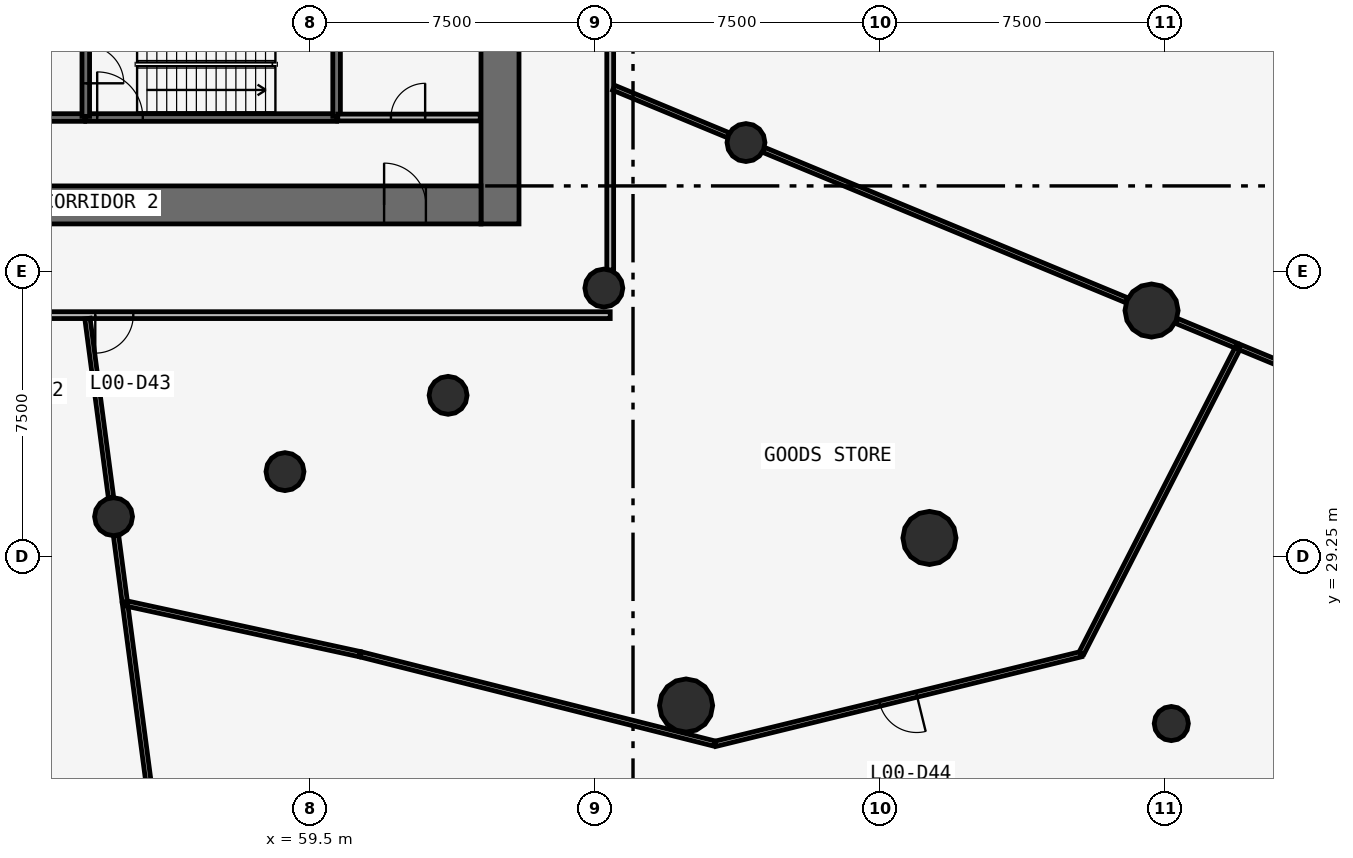
"""IFC4 building model, lengths in metres.
Left out: names, types, materials, properties, quantities, classifications, styles, units other than length and angle.
Written with IfcOpenShell. Run it as: python <this file> out.ifc"""

import sys

from ifc_helpers import new_model, si_unit, direction, frame, frame_2d, origin, origin_2d, place, context, subcontext, project, spatial, rectangle, circle, extrude, source, transform, mapped, element, fill, save


model = new_model("IFC4")
c1 = context("Model", 3, precision=1e-05, world=origin(), true_north=direction((0.0, 1.0)))
c2 = subcontext(c1, "Body", "Model", "MODEL_VIEW")
j1 = project(units=[si_unit("LENGTHUNIT", "METRE"), si_unit("PLANEANGLEUNIT", "RADIAN")], contexts=[c1])
p1 = place(None, origin())
s1 = spatial("IfcSite", under=j1, at=p1, CompositionType="ELEMENT")
p2 = place(p1, origin())
s2 = spatial("IfcBuilding", under=s1, at=p2, CompositionType="ELEMENT")
p3 = place(p2, origin())
s3 = spatial("IfcBuildingStorey", under=s2, at=p3, CompositionType="ELEMENT", Elevation=0.0)
p4 = place(p3, frame((64.5, 38.0, -0.35), z_axis=(0.0, 0.0, 1.0), x_axis=(0.0, 1.0, 0.0)))
e1 = element("IfcWall", 1, at=p4, inside=s3, PredefinedType="SHEAR", context=c2, shape_type="SweptSolid", body=[
    extrude(rectangle(XDim=20.0, YDim=1.0, at=frame_2d((10.0, 0.0))), origin(), (0.0, 0.0, 1.0), 5.35),
])
p5 = place(p4, frame((9.1, 0.0, 0.35)))
e2 = element("IfcOpeningElement", 2, at=p5, cuts=e1, PredefinedType="OPENING", context=c2, shape_type="SweptSolid", body=[
    extrude(rectangle(XDim=1.8, YDim=2.1, at=frame_2d((0.9, 1.05))), frame((0.0, 0.51, 0.0), z_axis=(0.0, -1.0, 0.0), x_axis=(1.0, 0.0, 0.0)), (0.0, 0.0, 1.0), 1.02),
])
p6 = place(p3, frame((40.0, 38.5, -0.35), z_axis=(0.0, 0.0, 1.0), x_axis=(1.0, 0.0, 0.0)))
e3 = element("IfcWall", 3, at=p6, inside=s3, PredefinedType="SHEAR", context=c2, shape_type="SweptSolid", body=[
    extrude(rectangle(XDim=24.0, YDim=1.0, at=frame_2d((12.0, 0.0))), origin(), (0.0, 0.0, 1.0), 5.35),
])
p7 = place(p6, frame((21.45, 0.0, 0.35)))
e4 = element("IfcOpeningElement", 4, at=p7, cuts=e3, PredefinedType="OPENING", context=c2, shape_type="SweptSolid", body=[
    extrude(rectangle(XDim=1.1, YDim=2.1, at=frame_2d((0.55, 1.05))), frame((0.0, 0.51, 0.0), z_axis=(0.0, -1.0, 0.0), x_axis=(1.0, 0.0, 0.0)), (0.0, 0.0, 1.0), 1.02),
])
p8 = place(p6, frame((1.95, 0.0, 0.35)))
e5 = element("IfcOpeningElement", 5, at=p8, cuts=e3, PredefinedType="OPENING", context=c2, shape_type="SweptSolid", body=[
    extrude(rectangle(XDim=1.1, YDim=2.1, at=frame_2d((0.55, 1.05))), frame((0.0, 0.51, 0.0), z_axis=(0.0, -1.0, 0.0), x_axis=(1.0, 0.0, 0.0)), (0.0, 0.0, 1.0), 1.02),
])
m1 = source(origin(), c2, "Body", "SweptSolid", [
    extrude(circle(Radius=0.7, at=origin_2d()), origin(), (0.0, 0.0, 1.0), 5.35),
])
for number, where, z_axis, x_axis in (
    (6, (69.396, 25.328, -0.35), (0.0, 0.0, 1.0), (1.0, 0.0, 0.0)),
    (7, (75.801, 29.737, -0.35), (0.0, 0.0, 1.0), (1.0, 0.0, 0.0)),
    (8, (81.645, 35.721, -0.35), (0.0, 0.0, 1.0), (1.0, 0.0, 0.0)),
):
    element("IfcColumn", number, at=place(p3, frame(where, z_axis=z_axis, x_axis=x_axis)), inside=s3, PredefinedType="COLUMN", context=c2, shape_type="MappedRepresentation", body=[
        mapped(m1, transform((0.0, 0.0, 0.0), scale=1.0)),
    ])
m2 = source(origin(), c2, "Body", "SweptSolid", [
    extrude(circle(Radius=0.5, at=origin_2d()), origin(), (0.0, 0.0, 1.0), 5.35),
])
for number, where, z_axis, x_axis in (
    (9, (54.331, 30.297, -0.35), (0.0, 0.0, 1.0), (1.0, 0.0, 0.0)),
    (10, (58.842, 31.482, -0.35), (0.0, 0.0, 1.0), (1.0, 0.0, 0.0)),
    (11, (63.134, 33.49, -0.35), (0.0, 0.0, 1.0), (1.0, 0.0, 0.0)),
    (12, (67.232, 36.312, -0.35), (0.0, 0.0, 1.0), (1.0, 0.0, 0.0)),
    (13, (70.972, 40.141, -0.35), (0.0, 0.0, 1.0), (1.0, 0.0, 0.0)),
):
    element("IfcColumn", number, at=place(p3, frame(where, z_axis=z_axis, x_axis=x_axis)), inside=s3, PredefinedType="COLUMN", context=c2, shape_type="MappedRepresentation", body=[
        mapped(m2, transform((0.0, 0.0, 0.0), scale=1.0)),
    ])
m3 = source(origin(), c2, "Body", "SweptSolid", [
    extrude(circle(Radius=0.45, at=origin_2d()), origin(), (0.0, 0.0, 1.0), 5.35),
])
p9 = place(p3, frame((82.165, 24.854, -0.35), z_axis=(0.0, 0.0, 1.0), x_axis=(1.0, 0.0, 0.0)))
e14 = element("IfcColumn", 14, at=p9, inside=s3, PredefinedType="COLUMN", context=c2, shape_type="MappedRepresentation", body=[
    mapped(m3, transform((0.0, 0.0, 0.0), scale=1.0)),
])
p10 = place(p3, frame((53.6, 40.8, 0.0), z_axis=(0.0, 0.0, 1.0), x_axis=(1.0, 0.0, 0.0)))
e15 = element("IfcWall", 15, at=p10, inside=s3, PredefinedType="SOLIDWALL", context=c2, shape_type="SweptSolid", body=[
    extrude(rectangle(XDim=6.6, YDim=0.2, at=frame_2d((3.3, 0.0))), origin(), (0.0, 0.0, 1.0), 4.65),
])
p11 = place(p10, frame((0.3, 0.0, 0.0)))
e16 = element("IfcOpeningElement", 16, at=p11, cuts=e15, PredefinedType="OPENING", context=c2, shape_type="SweptSolid", body=[
    extrude(rectangle(XDim=1.2, YDim=2.1, at=frame_2d((0.6, 1.05))), frame((0.0, 0.11, 0.0), z_axis=(0.0, -1.0, 0.0), x_axis=(1.0, 0.0, 0.0)), (0.0, 0.0, 1.0), 0.22),
])
p12 = place(p3, frame((47.9, 40.8, 0.0), z_axis=(0.0, 0.0, 1.0), x_axis=(1.0, 0.0, 0.0)))
e17 = element("IfcWall", 17, at=p12, inside=s3, PredefinedType="SOLIDWALL", context=c2, shape_type="SweptSolid", body=[
    extrude(rectangle(XDim=5.67, YDim=0.2, at=frame_2d((2.835, 0.0))), origin(), (0.0, 0.0, 1.0), 4.65),
])
p13 = place(p12, frame((2.95, 0.0, 0.0)))
e18 = element("IfcOpeningElement", 18, at=p13, cuts=e17, PredefinedType="OPENING", context=c2, shape_type="SweptSolid", body=[
    extrude(rectangle(XDim=1.1, YDim=2.1, at=frame_2d((0.55, 1.05))), frame((0.0, 0.11, 0.0), z_axis=(0.0, -1.0, 0.0), x_axis=(1.0, 0.0, 0.0)), (0.0, 0.0, 1.0), 0.22),
])
p14 = place(p3, frame((60.2, 40.83, 0.0), z_axis=(0.0, 0.0, 1.0), x_axis=(0.0, 1.0, 0.0)))
e19 = element("IfcWall", 19, at=p14, inside=s3, PredefinedType="SOLIDWALL", context=c2, shape_type="SweptSolid", body=[
    extrude(rectangle(XDim=2.77, YDim=0.2, at=frame_2d((1.385, 0.0))), origin(), (0.0, 0.0, 1.0), 4.65),
])
p15 = place(p3, frame((53.6, 43.6, 0.0), z_axis=(0.0, 0.0, 1.0), x_axis=(0.0, -1.0, 0.0)))
e20 = element("IfcWall", 20, at=p15, inside=s3, PredefinedType="SOLIDWALL", context=c2, shape_type="SweptSolid", body=[
    extrude(rectangle(XDim=2.77, YDim=0.2, at=frame_2d((1.385, 0.0))), origin(), (0.0, 0.0, 1.0), 4.65),
])
p16 = place(p15, frame((0.9, 0.0, 0.0)))
e21 = element("IfcOpeningElement", 21, at=p16, cuts=e20, PredefinedType="OPENING", context=c2, shape_type="SweptSolid", body=[
    extrude(rectangle(XDim=1.0, YDim=2.1, at=frame_2d((0.5, 1.05))), frame((0.0, 0.11, 0.0), z_axis=(0.0, -1.0, 0.0), x_axis=(1.0, 0.0, 0.0)), (0.0, 0.0, 1.0), 0.22),
])
p17 = place(p3, frame((67.4, 35.6, 0.0), z_axis=(0.0, 0.0, 1.0), x_axis=(-1.0, 0.0, 0.0)))
e22 = element("IfcWall", 22, at=p17, inside=s3, PredefinedType="PARTITIONING", context=c2, shape_type="SweptSolid", body=[
    extrude(rectangle(XDim=30.8, YDim=0.18, at=frame_2d((15.4, 0.0))), origin(), (0.0, 0.0, 1.0), 3.85),
])
p18 = place(p17, frame((20.95, 0.0, 0.0)))
e23 = element("IfcOpeningElement", 23, at=p18, cuts=e22, PredefinedType="OPENING", context=c2, shape_type="SweptSolid", body=[
    extrude(rectangle(XDim=1.0, YDim=2.1, at=frame_2d((0.5, 1.05))), frame((0.0, 0.1, 0.0), z_axis=(0.0, -1.0, 0.0), x_axis=(1.0, 0.0, 0.0)), (0.0, 0.0, 1.0), 0.2),
])
p19 = place(p17, frame((14.95, 0.0, 0.0)))
e24 = element("IfcOpeningElement", 24, at=p19, cuts=e22, PredefinedType="OPENING", context=c2, shape_type="SweptSolid", body=[
    extrude(rectangle(XDim=1.0, YDim=2.1, at=frame_2d((0.5, 1.05))), frame((0.0, 0.1, 0.0), z_axis=(0.0, -1.0, 0.0), x_axis=(1.0, 0.0, 0.0)), (0.0, 0.0, 1.0), 0.2),
])
p20 = place(p17, frame((12.55, 0.0, 0.0)))
e25 = element("IfcOpeningElement", 25, at=p20, cuts=e22, PredefinedType="OPENING", context=c2, shape_type="SweptSolid", body=[
    extrude(rectangle(XDim=1.0, YDim=2.1, at=frame_2d((0.5, 1.05))), frame((0.0, 0.1, 0.0), z_axis=(0.0, -1.0, 0.0), x_axis=(1.0, 0.0, 0.0)), (0.0, 0.0, 1.0), 0.2),
])
p21 = place(p3, frame((67.4, 60.37, 0.0), z_axis=(0.0, 0.0, 1.0), x_axis=(0.0, -1.0, 0.0)))
e26 = element("IfcWall", 26, at=p21, inside=s3, PredefinedType="PARTITIONING", context=c2, shape_type="SweptSolid", body=[
    extrude(rectangle(XDim=23.583, YDim=0.18, at=frame_2d((11.791, 0.0))), origin(), (0.0, 0.0, 1.0), 3.85),
])
p22 = place(p21, frame((11.333, 0.0, 0.0)))
e27 = element("IfcOpeningElement", 27, at=p22, cuts=e26, PredefinedType="OPENING", context=c2, shape_type="SweptSolid", body=[
    extrude(rectangle(XDim=1.0, YDim=2.1, at=frame_2d((0.5, 1.05))), frame((0.0, 0.1, 0.0), z_axis=(0.0, -1.0, 0.0), x_axis=(1.0, 0.0, 0.0)), (0.0, 0.0, 1.0), 0.2),
])
p23 = place(p21, frame((4.532, 0.0, 0.0)))
e28 = element("IfcOpeningElement", 28, at=p23, cuts=e26, PredefinedType="OPENING", context=c2, shape_type="SweptSolid", body=[
    extrude(rectangle(XDim=1.0, YDim=2.1, at=frame_2d((0.5, 1.05))), frame((0.0, 0.1, 0.0), z_axis=(0.0, -1.0, 0.0), x_axis=(1.0, 0.0, 0.0)), (0.0, 0.0, 1.0), 0.2),
])
p24 = place(p3, frame((60.23, 40.8, 0.0), z_axis=(0.0, 0.0, 1.0), x_axis=(1.0, 0.0, 0.0)))
e29 = element("IfcWall", 29, at=p24, inside=s3, PredefinedType="PARTITIONING", context=c2, shape_type="SweptSolid", body=[
    extrude(rectangle(XDim=3.75, YDim=0.18, at=frame_2d((1.875, 0.0))), origin(), (0.0, 0.0, 1.0), 4.65),
])
p25 = place(p24, frame((1.4, 0.0, 0.0)))
e30 = element("IfcOpeningElement", 30, at=p25, cuts=e29, PredefinedType="OPENING", context=c2, shape_type="SweptSolid", body=[
    extrude(rectangle(XDim=0.9, YDim=2.1, at=frame_2d((0.45, 1.05))), frame((0.0, 0.1, 0.0), z_axis=(0.0, -1.0, 0.0), x_axis=(1.0, 0.0, 0.0)), (0.0, 0.0, 1.0), 0.2),
])
p26 = place(p3, frame((71.439, 39.948, 0.0), z_axis=(0.0, 0.0, 1.0), x_axis=(0.923874685699, -0.382695133396, 0.0)))
e31 = element("IfcWall", 31, at=p26, inside=s3, PredefinedType="PARTITIONING", context=c2, shape_type="SweptSolid", body=[
    extrude(rectangle(XDim=10.341, YDim=0.14, at=frame_2d((5.17, 0.0))), origin(), (0.0, 0.0, 1.0), 3.85),
])
p27 = place(p3, frame((79.788, 26.678, 0.0), z_axis=(0.0, 0.0, 1.0), x_axis=(-0.971254631913, -0.238042937278, 0.0)))
e32 = element("IfcWall", 32, at=p27, inside=s3, PredefinedType="PARTITIONING", context=c2, shape_type="SweptSolid", body=[
    extrude(rectangle(XDim=9.902, YDim=0.14, at=frame_2d((4.951, 0.0))), origin(), (0.0, 0.0, 1.0), 3.85),
])
p28 = place(p27, frame((4.452, 0.0, 0.0)))
e33 = element("IfcOpeningElement", 33, at=p28, cuts=e32, PredefinedType="OPENING", context=c2, shape_type="SweptSolid", body=[
    extrude(rectangle(XDim=1.0, YDim=2.1, at=frame_2d((0.5, 1.05))), frame((0.0, 0.08, 0.0), z_axis=(0.0, -1.0, 0.0), x_axis=(1.0, 0.0, 0.0)), (0.0, 0.0, 1.0), 0.16),
])
p29 = place(p3, frame((60.833, 26.674, 0.0), z_axis=(0.0, 0.0, 1.0), x_axis=(0.969661844415, -0.244450214738, 0.0)))
e34 = element("IfcWall", 34, at=p29, inside=s3, PredefinedType="PARTITIONING", context=c2, shape_type="SweptSolid", body=[
    extrude(rectangle(XDim=9.599, YDim=0.14, at=frame_2d((4.799, 0.0))), origin(), (0.0, 0.0, 1.0), 3.85),
])
p30 = place(p3, frame((79.801, 26.705, 0.0), z_axis=(0.0, 0.0, 1.0), x_axis=(0.455715060909, 0.890125712055, 0.0)))
e35 = element("IfcWall", 35, at=p30, inside=s3, PredefinedType="PARTITIONING", context=c2, shape_type="SweptSolid", body=[
    extrude(rectangle(XDim=9.064, YDim=0.14, at=frame_2d((4.532, 0.0))), origin(), (0.0, 0.0, 1.0), 3.85),
])
p31 = place(p3, frame((82.296, 35.451, 0.0), z_axis=(0.0, 0.0, 1.0), x_axis=(0.923894384947, -0.382647573445, 0.0)))
e36 = element("IfcWall", 36, at=p31, inside=s3, PredefinedType="PARTITIONING", context=c2, shape_type="SweptSolid", body=[
    extrude(rectangle(XDim=1.701, YDim=0.14, at=frame_2d((0.851, 0.0))), origin(), (0.0, 0.0, 1.0), 3.85),
])
p32 = place(p3, frame((83.96, 34.762, 0.0), z_axis=(0.0, 0.0, 1.0), x_axis=(0.923875284448, -0.382693687936, 0.0)))
e37 = element("IfcWall", 37, at=p32, inside=s3, PredefinedType="PARTITIONING", context=c2, shape_type="SweptSolid", body=[
    extrude(rectangle(XDim=5.298, YDim=0.14, at=frame_2d((2.649, 0.0))), origin(), (0.0, 0.0, 1.0), 3.85),
])
p33 = place(p3, frame((54.63, 28.022, 0.0), z_axis=(0.0, 0.0, 1.0), x_axis=(0.130536083574, -0.991443559102, 0.0)))
e38 = element("IfcWall", 38, at=p33, inside=s3, PredefinedType="PARTITIONING", context=c2, shape_type="SweptSolid", body=[
    extrude(rectangle(XDim=7.045, YDim=0.14, at=frame_2d((3.523, 0.0))), origin(), (0.0, 0.0, 1.0), 3.85),
])
p34 = place(p3, frame((54.703, 28.006, 0.0), z_axis=(0.0, 0.0, 1.0), x_axis=(0.977213758918, -0.212257554358, 0.0)))
e39 = element("IfcWall", 39, at=p34, inside=s3, PredefinedType="PARTITIONING", context=c2, shape_type="SweptSolid", body=[
    extrude(rectangle(XDim=6.243, YDim=0.14, at=frame_2d((3.122, 0.0))), origin(), (0.0, 0.0, 1.0), 3.85),
])
p35 = place(p3, frame((53.644, 35.51, 0.0), z_axis=(0.0, 0.0, 1.0), x_axis=(0.130548834981, -0.991441880135, 0.0)))
e40 = element("IfcWall", 40, at=p35, inside=s3, PredefinedType="PARTITIONING", context=c2, shape_type="SweptSolid", body=[
    extrude(rectangle(XDim=4.754, YDim=0.14, at=frame_2d((2.377, 0.0))), origin(), (0.0, 0.0, 1.0), 3.85),
])
p36 = place(p3, frame((67.49, 41.584, 0.0), z_axis=(0.0, 0.0, 1.0), x_axis=(0.923911109142, -0.382607190737, 0.0)))
e41 = element("IfcWall", 41, at=p36, inside=s3, PredefinedType="PARTITIONING", context=c2, shape_type="SweptSolid", body=[
    extrude(rectangle(XDim=3.264, YDim=0.14, at=frame_2d((1.632, 0.0))), origin(), (0.0, 0.0, 1.0), 3.85),
])
p37 = place(p3, frame((54.396, 29.797, 0.0), z_axis=(0.0, 0.0, 1.0), x_axis=(0.130537046291, -0.991443432348, 0.0)))
e42 = element("IfcWall", 42, at=p37, inside=s3, PredefinedType="PARTITIONING", context=c2, shape_type="SweptSolid", body=[
    extrude(rectangle(XDim=1.76, YDim=0.14, at=frame_2d((0.88, 0.0))), origin(), (0.0, 0.0, 1.0), 3.85),
])
m4 = source(origin(), c2, "Body", "SweptSolid", [
    extrude(rectangle(XDim=1.2, YDim=2.1, at=frame_2d((0.6, 1.05))), frame((0.0, 0.025, 0.0), z_axis=(0.0, -1.0, 0.0), x_axis=(1.0, 0.0, 0.0)), (0.0, 0.0, 1.0), 0.05),
])
p38 = place(p11, origin())
e43 = element("IfcDoor", 43, at=p38, inside=s3, OperationType="SINGLE_SWING_LEFT", PredefinedType="DOOR", context=c2, shape_type="MappedRepresentation", body=[
    mapped(m4, transform((0.0, 0.0, 0.0), scale=1.0)),
])
fill(e16, e43)
m5 = source(origin(), c2, "Body", "SweptSolid", [
    extrude(rectangle(XDim=1.0, YDim=2.1, at=frame_2d((0.5, 1.05))), frame((0.0, 0.025, 0.0), z_axis=(0.0, -1.0, 0.0), x_axis=(1.0, 0.0, 0.0)), (0.0, 0.0, 1.0), 0.05),
])
p39 = place(p16, origin())
e44 = element("IfcDoor", 44, at=p39, inside=s3, OperationType="SINGLE_SWING_RIGHT", PredefinedType="DOOR", context=c2, shape_type="MappedRepresentation", body=[
    mapped(m5, transform((0.0, 0.0, 0.0), scale=1.0)),
])
fill(e21, e44)
m6 = source(origin(), c2, "Body", "SweptSolid", [
    extrude(rectangle(XDim=1.1, YDim=2.1, at=frame_2d((0.55, 1.05))), frame((0.0, 0.025, 0.0), z_axis=(0.0, -1.0, 0.0), x_axis=(1.0, 0.0, 0.0)), (0.0, 0.0, 1.0), 0.05),
])
p40 = place(p7, origin())
e45 = element("IfcDoor", 45, at=p40, inside=s3, OperationType="SINGLE_SWING_LEFT", PredefinedType="DOOR", context=c2, shape_type="MappedRepresentation", body=[
    mapped(m6, transform((0.0, 0.0, 0.0), scale=1.0)),
])
fill(e4, e45)
m7 = source(origin(), c2, "Body", "SweptSolid", [
    extrude(rectangle(XDim=1.0, YDim=2.1, at=frame_2d((0.5, 1.05))), frame((0.0, 0.025, 0.0), z_axis=(0.0, -1.0, 0.0), x_axis=(1.0, 0.0, 0.0)), (0.0, 0.0, 1.0), 0.05),
])
p41 = place(p20, origin())
e46 = element("IfcDoor", 46, at=p41, inside=s3, OperationType="SINGLE_SWING_RIGHT", PredefinedType="DOOR", context=c2, shape_type="MappedRepresentation", body=[
    mapped(m7, transform((0.0, 0.0, 0.0), scale=1.0)),
])
fill(e25, e46)
p42 = place(p28, origin())
e47 = element("IfcDoor", 47, at=p42, inside=s3, OperationType="SINGLE_SWING_LEFT", PredefinedType="DOOR", context=c2, shape_type="MappedRepresentation", body=[
    mapped(m7, transform((0.0, 0.0, 0.0), scale=1.0)),
])
fill(e33, e47)
m8 = source(origin(), c2, "Body", "SweptSolid", [
    extrude(rectangle(XDim=0.9, YDim=2.1, at=frame_2d((0.45, 1.05))), frame((0.0, 0.025, 0.0), z_axis=(0.0, -1.0, 0.0), x_axis=(1.0, 0.0, 0.0)), (0.0, 0.0, 1.0), 0.05),
])
p43 = place(p25, origin())
e48 = element("IfcDoor", 48, at=p43, inside=s3, OperationType="SINGLE_SWING_RIGHT", PredefinedType="DOOR", context=c2, shape_type="MappedRepresentation", body=[
    mapped(m8, transform((0.0, 0.0, 0.0), scale=1.0)),
])
fill(e30, e48)
save(model, sys.argv[1])
